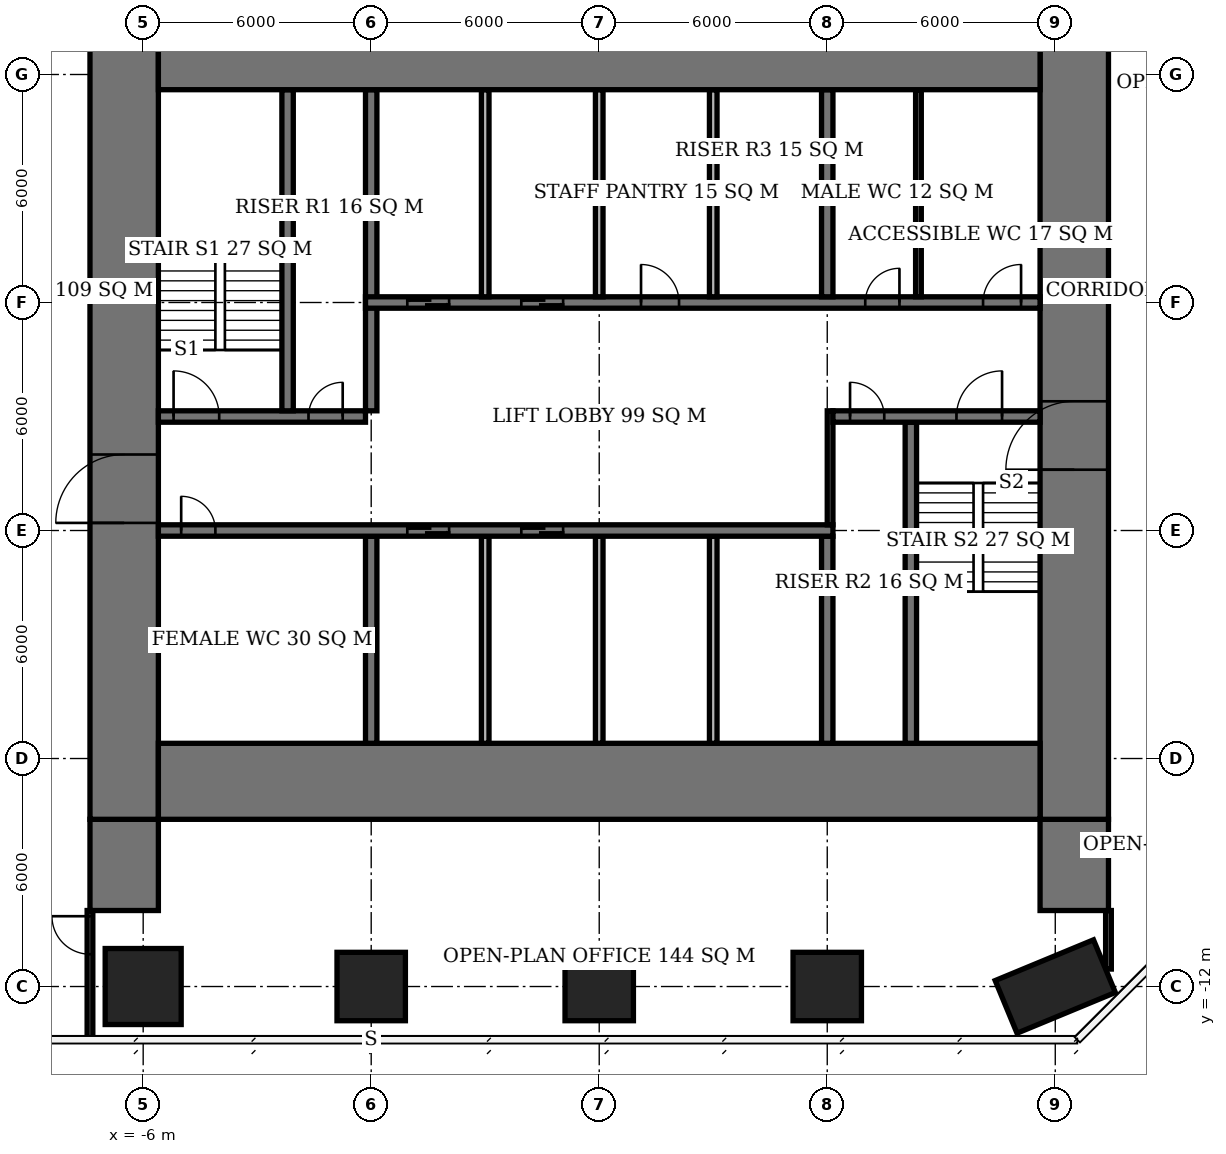
"""IFC4 building model, lengths in metres.
Left out: names, types, materials, properties, quantities, classifications, styles, units other than length and angle.
Written with IfcOpenShell. Run it as: python <this file> out.ifc"""

import sys

from ifc_helpers import new_model, si_unit, direction, frame, frame_2d, origin, origin_2d, place, context, subcontext, project, spatial, rectangle, extrude, element, fill, save


model = new_model("IFC4")
c1 = context("Model", 3, precision=1e-05, world=origin(), true_north=direction((0.0, 1.0)))
c2 = subcontext(c1, "Body", "Model", "MODEL_VIEW")
j1 = project(units=[si_unit("LENGTHUNIT", "METRE"), si_unit("PLANEANGLEUNIT", "RADIAN")], contexts=[c1])
p1 = place(None, origin())
s1 = spatial("IfcSite", under=j1, at=p1, CompositionType="ELEMENT")
p2 = place(p1, origin())
s2 = spatial("IfcBuilding", under=s1, at=p2, CompositionType="ELEMENT")
p3 = place(p2, frame((0.0, 0.0, 97.7)))
s3 = spatial("IfcBuildingStorey", under=s2, at=p3, CompositionType="ELEMENT", Elevation=97.7)
p4 = place(p3, frame((-6.0, -12.0, 0.0), z_axis=(0.0, 0.0, 1.0), x_axis=(1.0, 0.0, 0.0)))
e1 = element("IfcColumn", 1, at=p4, inside=s3, PredefinedType="COLUMN", context=c2, shape_type="SweptSolid", body=[
    extrude(rectangle(XDim=2.0, YDim=2.0, at=origin_2d()), origin(), (0.0, 0.0, 1.0), 3.9),
])
for number, where, z_axis, x_axis in (
    (2, (0.0, -12.0, 0.0), (0.0, 0.0, 1.0), (1.0, 0.0, 0.0)),
    (3, (6.0, -12.0, 0.0), (0.0, 0.0, 1.0), (1.0, 0.0, 0.0)),
    (4, (12.0, -12.0, 0.0), (0.0, 0.0, 1.0), (1.0, 0.0, 0.0)),
):
    element("IfcColumn", number, at=place(p3, frame(where, z_axis=z_axis, x_axis=x_axis)), inside=s3, PredefinedType="COLUMN", context=c2, shape_type="SweptSolid", body=[
        extrude(rectangle(XDim=1.8, YDim=1.8, at=origin_2d()), origin(), (0.0, 0.0, 1.0), 3.9),
    ])
p5 = place(p3, frame((18.0, -12.0, 0.0), z_axis=(0.0, 0.0, 1.0), x_axis=(-0.923879532511, -0.382683432365, 0.0)))
e5 = element("IfcColumn", 5, at=p5, inside=s3, PredefinedType="COLUMN", context=c2, shape_type="SweptSolid", body=[
    extrude(rectangle(XDim=2.8, YDim=1.5, at=origin_2d()), origin(), (0.0, 0.0, 1.0), 3.9),
])
for number, where, z_axis, x_axis in (
    (6, (-5.6, -6.6, 0.0), (0.0, 0.0, 1.0), (1.0, 0.0, 0.0)),
    (7, (-5.6, 12.6, 0.0), (0.0, 0.0, 1.0), (1.0, 0.0, 0.0)),
):
    element("IfcWall", number, at=place(p3, frame(where, z_axis=z_axis, x_axis=x_axis)), inside=s3, PredefinedType="SHEAR", context=c2, shape_type="SweptSolid", body=[
        extrude(rectangle(XDim=23.2, YDim=2.0, at=frame_2d((11.6, 0.0))), origin(), (0.0, 0.0, 1.0), 3.9),
    ])
p6 = place(p3, frame((-6.5, -7.6, 0.0), z_axis=(0.0, 0.0, 1.0), x_axis=(0.0, 1.0, 0.0)))
e8 = element("IfcWall", 8, at=p6, inside=s3, PredefinedType="SHEAR", context=c2, shape_type="SweptSolid", body=[
    extrude(rectangle(XDim=21.2, YDim=1.8, at=frame_2d((10.6, 0.0))), origin(), (0.0, 0.0, 1.0), 3.9),
])
p7 = place(p6, frame((7.8, 0.0, 0.0)))
e9 = element("IfcOpeningElement", 9, at=p7, cuts=e8, PredefinedType="OPENING", context=c2, shape_type="SweptSolid", body=[
    extrude(rectangle(XDim=1.8, YDim=2.4, at=frame_2d((0.9, 1.2))), frame((0.0, 0.91, 0.0), z_axis=(0.0, -1.0, 0.0), x_axis=(1.0, 0.0, 0.0)), (0.0, 0.0, 1.0), 1.82),
])
p8 = place(p3, frame((18.5, -7.6, 0.0), z_axis=(0.0, 0.0, 1.0), x_axis=(0.0, 1.0, 0.0)))
e10 = element("IfcWall", 10, at=p8, inside=s3, PredefinedType="SHEAR", context=c2, shape_type="SweptSolid", body=[
    extrude(rectangle(XDim=21.2, YDim=1.8, at=frame_2d((10.6, 0.0))), origin(), (0.0, 0.0, 1.0), 3.9),
])
p9 = place(p8, frame((9.2, 0.0, 0.0)))
e11 = element("IfcOpeningElement", 11, at=p9, cuts=e10, PredefinedType="OPENING", context=c2, shape_type="SweptSolid", body=[
    extrude(rectangle(XDim=1.8, YDim=2.4, at=frame_2d((0.9, 1.2))), frame((0.0, 0.91, 0.0), z_axis=(0.0, -1.0, 0.0), x_axis=(1.0, 0.0, 0.0)), (0.0, 0.0, 1.0), 1.82),
])
for number, where, z_axis, x_axis in (
    (12, (-6.5, -10.0, 0.0), (0.0, 0.0, 1.0), (0.0, 1.0, 0.0)),
    (13, (18.5, -10.0, 0.0), (0.0, 0.0, 1.0), (0.0, 1.0, 0.0)),
):
    element("IfcWall", number, at=place(p3, frame(where, z_axis=z_axis, x_axis=x_axis)), inside=s3, PredefinedType="SHEAR", context=c2, shape_type="SweptSolid", body=[
        extrude(rectangle(XDim=2.4, YDim=1.8, at=frame_2d((1.2, 0.0))), origin(), (0.0, 0.0, 1.0), 3.9),
    ])
p10 = place(p3, frame((-5.6, 0.0, 0.0), z_axis=(0.0, 0.0, 1.0), x_axis=(1.0, 0.0, 0.0)))
e14 = element("IfcWall", 14, at=p10, inside=s3, PredefinedType="SHEAR", context=c2, shape_type="SweptSolid", body=[
    extrude(rectangle(XDim=17.75, YDim=0.3, at=frame_2d((8.875, 0.0))), origin(), (0.0, 0.0, 1.0), 3.9),
])
p11 = place(p10, frame((0.6, 0.0, 0.0)))
e15 = element("IfcOpeningElement", 15, at=p11, cuts=e14, PredefinedType="OPENING", context=c2, shape_type="SweptSolid", body=[
    extrude(rectangle(XDim=0.9, YDim=2.1, at=frame_2d((0.45, 1.05))), frame((0.0, 0.16, 0.0), z_axis=(0.0, -1.0, 0.0), x_axis=(1.0, 0.0, 0.0)), (0.0, 0.0, 1.0), 0.32),
])
p12 = place(p10, frame((6.55, 0.0, 0.0)))
e16 = element("IfcOpeningElement", 16, at=p12, cuts=e14, PredefinedType="OPENING", context=c2, shape_type="SweptSolid", body=[
    extrude(rectangle(XDim=1.1, YDim=2.1, at=frame_2d((0.55, 1.05))), frame((0.0, 0.16, 0.0), z_axis=(0.0, -1.0, 0.0), x_axis=(1.0, 0.0, 0.0)), (0.0, 0.0, 1.0), 0.32),
])
p13 = place(p10, frame((9.55, 0.0, 0.0)))
e17 = element("IfcOpeningElement", 17, at=p13, cuts=e14, PredefinedType="OPENING", context=c2, shape_type="SweptSolid", body=[
    extrude(rectangle(XDim=1.1, YDim=2.1, at=frame_2d((0.55, 1.05))), frame((0.0, 0.16, 0.0), z_axis=(0.0, -1.0, 0.0), x_axis=(1.0, 0.0, 0.0)), (0.0, 0.0, 1.0), 0.32),
])
p14 = place(p3, frame((-5.6, 3.0, 0.0), z_axis=(0.0, 0.0, 1.0), x_axis=(1.0, 0.0, 0.0)))
e18 = element("IfcWall", 18, at=p14, inside=s3, PredefinedType="SHEAR", context=c2, shape_type="SweptSolid", body=[
    extrude(rectangle(XDim=5.45, YDim=0.3, at=frame_2d((2.725, 0.0))), origin(), (0.0, 0.0, 1.0), 3.9),
])
p15 = place(p14, frame((0.4, 0.0, 0.0)))
e19 = element("IfcOpeningElement", 19, at=p15, cuts=e18, PredefinedType="OPENING", context=c2, shape_type="SweptSolid", body=[
    extrude(rectangle(XDim=1.2, YDim=2.1, at=frame_2d((0.6, 1.05))), frame((0.0, 0.16, 0.0), z_axis=(0.0, -1.0, 0.0), x_axis=(1.0, 0.0, 0.0)), (0.0, 0.0, 1.0), 0.32),
])
p16 = place(p14, frame((3.95, 0.0, 0.0)))
e20 = element("IfcOpeningElement", 20, at=p16, cuts=e18, PredefinedType="OPENING", context=c2, shape_type="SweptSolid", body=[
    extrude(rectangle(XDim=0.9, YDim=2.1, at=frame_2d((0.45, 1.05))), frame((0.0, 0.16, 0.0), z_axis=(0.0, -1.0, 0.0), x_axis=(1.0, 0.0, 0.0)), (0.0, 0.0, 1.0), 0.32),
])
p17 = place(p3, frame((12.15, 3.0, 0.0), z_axis=(0.0, 0.0, 1.0), x_axis=(1.0, 0.0, 0.0)))
e21 = element("IfcWall", 21, at=p17, inside=s3, PredefinedType="SHEAR", context=c2, shape_type="SweptSolid", body=[
    extrude(rectangle(XDim=5.45, YDim=0.3, at=frame_2d((2.725, 0.0))), origin(), (0.0, 0.0, 1.0), 3.9),
])
p18 = place(p17, frame((3.25, 0.0, 0.0)))
e22 = element("IfcOpeningElement", 22, at=p18, cuts=e21, PredefinedType="OPENING", context=c2, shape_type="SweptSolid", body=[
    extrude(rectangle(XDim=1.2, YDim=2.1, at=frame_2d((0.6, 1.05))), frame((0.0, 0.16, 0.0), z_axis=(0.0, -1.0, 0.0), x_axis=(1.0, 0.0, 0.0)), (0.0, 0.0, 1.0), 0.32),
])
p19 = place(p17, frame((0.45, 0.0, 0.0)))
e23 = element("IfcOpeningElement", 23, at=p19, cuts=e21, PredefinedType="OPENING", context=c2, shape_type="SweptSolid", body=[
    extrude(rectangle(XDim=0.9, YDim=2.1, at=frame_2d((0.45, 1.05))), frame((0.0, 0.16, 0.0), z_axis=(0.0, -1.0, 0.0), x_axis=(1.0, 0.0, 0.0)), (0.0, 0.0, 1.0), 0.32),
])
p20 = place(p3, frame((-0.15, 6.0, 0.0), z_axis=(0.0, 0.0, 1.0), x_axis=(1.0, 0.0, 0.0)))
e24 = element("IfcWall", 24, at=p20, inside=s3, PredefinedType="SHEAR", context=c2, shape_type="SweptSolid", body=[
    extrude(rectangle(XDim=17.75, YDim=0.3, at=frame_2d((8.875, 0.0))), origin(), (0.0, 0.0, 1.0), 3.9),
])
p21 = place(p20, frame((13.15, 0.0, 0.0)))
e25 = element("IfcOpeningElement", 25, at=p21, cuts=e24, PredefinedType="OPENING", context=c2, shape_type="SweptSolid", body=[
    extrude(rectangle(XDim=0.9, YDim=2.1, at=frame_2d((0.45, 1.05))), frame((0.0, 0.16, 0.0), z_axis=(0.0, -1.0, 0.0), x_axis=(1.0, 0.0, 0.0)), (0.0, 0.0, 1.0), 0.32),
])
p22 = place(p20, frame((16.25, 0.0, 0.0)))
e26 = element("IfcOpeningElement", 26, at=p22, cuts=e24, PredefinedType="OPENING", context=c2, shape_type="SweptSolid", body=[
    extrude(rectangle(XDim=1.0, YDim=2.1, at=frame_2d((0.5, 1.05))), frame((0.0, 0.16, 0.0), z_axis=(0.0, -1.0, 0.0), x_axis=(1.0, 0.0, 0.0)), (0.0, 0.0, 1.0), 0.32),
])
p23 = place(p20, frame((7.25, 0.0, 0.0)))
e27 = element("IfcOpeningElement", 27, at=p23, cuts=e24, PredefinedType="OPENING", context=c2, shape_type="SweptSolid", body=[
    extrude(rectangle(XDim=1.0, YDim=2.1, at=frame_2d((0.5, 1.05))), frame((0.0, 0.16, 0.0), z_axis=(0.0, -1.0, 0.0), x_axis=(1.0, 0.0, 0.0)), (0.0, 0.0, 1.0), 0.32),
])
p24 = place(p20, frame((1.1, 0.0, 0.0)))
e28 = element("IfcOpeningElement", 28, at=p24, cuts=e24, PredefinedType="OPENING", context=c2, shape_type="SweptSolid", body=[
    extrude(rectangle(XDim=1.1, YDim=2.1, at=frame_2d((0.55, 1.05))), frame((0.0, 0.16, 0.0), z_axis=(0.0, -1.0, 0.0), x_axis=(1.0, 0.0, 0.0)), (0.0, 0.0, 1.0), 0.32),
])
p25 = place(p20, frame((4.1, 0.0, 0.0)))
e29 = element("IfcOpeningElement", 29, at=p25, cuts=e24, PredefinedType="OPENING", context=c2, shape_type="SweptSolid", body=[
    extrude(rectangle(XDim=1.1, YDim=2.1, at=frame_2d((0.55, 1.05))), frame((0.0, 0.16, 0.0), z_axis=(0.0, -1.0, 0.0), x_axis=(1.0, 0.0, 0.0)), (0.0, 0.0, 1.0), 0.32),
])
p26 = place(p3, frame((0.0, -5.6, 0.0), z_axis=(0.0, 0.0, 1.0), x_axis=(0.0, 1.0, 0.0)))
e30 = element("IfcWall", 30, at=p26, inside=s3, PredefinedType="SHEAR", context=c2, shape_type="SweptSolid", body=[
    extrude(rectangle(XDim=5.45, YDim=0.3, at=frame_2d((2.725, 0.0))), origin(), (0.0, 0.0, 1.0), 3.9),
])
p27 = place(p3, frame((0.0, 3.15, 0.0), z_axis=(0.0, 0.0, 1.0), x_axis=(0.0, 1.0, 0.0)))
e31 = element("IfcWall", 31, at=p27, inside=s3, PredefinedType="SHEAR", context=c2, shape_type="SweptSolid", body=[
    extrude(rectangle(XDim=8.45, YDim=0.3, at=frame_2d((4.225, 0.0))), origin(), (0.0, 0.0, 1.0), 3.9),
])
for number, where, z_axis, x_axis in (
    (32, (12.0, -5.6, 0.0), (0.0, 0.0, 1.0), (0.0, 1.0, 0.0)),
    (33, (12.0, 6.15, 0.0), (0.0, 0.0, 1.0), (0.0, 1.0, 0.0)),
):
    element("IfcWall", number, at=place(p3, frame(where, z_axis=z_axis, x_axis=x_axis)), inside=s3, PredefinedType="SHEAR", context=c2, shape_type="SweptSolid", body=[
        extrude(rectangle(XDim=5.45, YDim=0.3, at=frame_2d((2.725, 0.0))), origin(), (0.0, 0.0, 1.0), 3.9),
    ])
for number, where, z_axis, x_axis in (
    (34, (-2.2, 3.15, 0.0), (0.0, 0.0, 1.0), (0.0, 1.0, 0.0)),
    (35, (14.2, -5.6, 0.0), (0.0, 0.0, 1.0), (0.0, 1.0, 0.0)),
):
    element("IfcWall", number, at=place(p3, frame(where, z_axis=z_axis, x_axis=x_axis)), inside=s3, PredefinedType="SHEAR", context=c2, shape_type="SweptSolid", body=[
        extrude(rectangle(XDim=8.45, YDim=0.3, at=frame_2d((4.225, 0.0))), origin(), (0.0, 0.0, 1.0), 3.9),
    ])
for number, where, z_axis, x_axis in (
    (36, (3.0, 6.15, 0.0), (0.0, 0.0, 1.0), (0.0, 1.0, 0.0)),
    (37, (6.0, 6.15, 0.0), (0.0, 0.0, 1.0), (0.0, 1.0, 0.0)),
    (38, (9.0, 6.15, 0.0), (0.0, 0.0, 1.0), (0.0, 1.0, 0.0)),
    (39, (3.0, -5.6, 0.0), (0.0, 0.0, 1.0), (0.0, 1.0, 0.0)),
    (40, (6.0, -5.6, 0.0), (0.0, 0.0, 1.0), (0.0, 1.0, 0.0)),
    (41, (9.0, -5.6, 0.0), (0.0, 0.0, 1.0), (0.0, 1.0, 0.0)),
):
    element("IfcWall", number, at=place(p3, frame(where, z_axis=z_axis, x_axis=x_axis)), inside=s3, PredefinedType="SOLIDWALL", context=c2, shape_type="SweptSolid", body=[
        extrude(rectangle(XDim=5.45, YDim=0.2, at=frame_2d((2.725, 0.0))), origin(), (0.0, 0.0, 1.0), 3.9),
    ])
p28 = place(p3, frame((14.4, 6.15, 0.0), z_axis=(0.0, 0.0, 1.0), x_axis=(0.0, 1.0, 0.0)))
e42 = element("IfcWall", 42, at=p28, inside=s3, PredefinedType="PLUMBINGWALL", context=c2, shape_type="SweptSolid", body=[
    extrude(rectangle(XDim=5.45, YDim=0.15, at=frame_2d((2.725, 0.0))), origin(), (0.0, 0.0, 1.0), 3.65),
])
p29 = place(p3, frame((-7.4, -13.4, 0.0), z_axis=(0.0, 0.0, 1.0), x_axis=(0.0, 1.0, 0.0)))
e43 = element("IfcWall", 43, at=p29, inside=s3, PredefinedType="PARTITIONING", context=c2, shape_type="SweptSolid", body=[
    extrude(rectangle(XDim=3.4, YDim=0.15, at=frame_2d((1.7, 0.0))), origin(), (0.0, 0.0, 1.0), 3.65),
])
p30 = place(p29, frame((2.25, 0.0, 0.0)))
e44 = element("IfcOpeningElement", 44, at=p30, cuts=e43, PredefinedType="OPENING", context=c2, shape_type="SweptSolid", body=[
    extrude(rectangle(XDim=1.0, YDim=2.1, at=frame_2d((0.5, 1.05))), frame((0.0, 0.085, 0.0), z_axis=(0.0, -1.0, 0.0), x_axis=(1.0, 0.0, 0.0)), (0.0, 0.0, 1.0), 0.17),
])
p31 = place(p3, frame((19.4, -11.541, 0.0), z_axis=(0.0, 0.0, 1.0), x_axis=(0.0, 1.0, 0.0)))
e45 = element("IfcWall", 45, at=p31, inside=s3, PredefinedType="PARTITIONING", context=c2, shape_type="SweptSolid", body=[
    extrude(rectangle(XDim=1.541, YDim=0.15, at=frame_2d((0.77, 0.0))), origin(), (0.0, 0.0, 1.0), 3.65),
])
p32 = place(p3, frame((12.075, 0.15, 0.0), z_axis=(0.0, 0.0, 1.0), x_axis=(0.0, 1.0, 0.0)))
e46 = element("IfcWall", 46, at=p32, inside=s3, PredefinedType="PARTITIONING", context=c2, shape_type="SweptSolid", body=[
    extrude(rectangle(XDim=3.0, YDim=0.15, at=frame_2d((1.5, 0.0))), origin(), (0.0, 0.0, 1.0), 3.65),
])
p33 = place(p7, origin())
e47 = element("IfcDoor", 47, at=p33, inside=s3, OperationType="DOUBLE_DOOR_SINGLE_SWING", PredefinedType="DOOR", context=c2, shape_type="SweptSolid", body=[
    extrude(rectangle(XDim=1.8, YDim=2.4, at=frame_2d((0.9, 1.2))), frame((0.0, 0.025, 0.0), z_axis=(0.0, -1.0, 0.0), x_axis=(1.0, 0.0, 0.0)), (0.0, 0.0, 1.0), 0.05),
])
fill(e9, e47)
p34 = place(p9, origin())
e48 = element("IfcDoor", 48, at=p34, inside=s3, OperationType="DOUBLE_DOOR_SINGLE_SWING", PredefinedType="DOOR", context=c2, shape_type="SweptSolid", body=[
    extrude(rectangle(XDim=1.8, YDim=2.4, at=frame_2d((0.9, 1.2))), frame((0.0, 0.025, 0.0), z_axis=(0.0, -1.0, 0.0), x_axis=(1.0, 0.0, 0.0)), (0.0, 0.0, 1.0), 0.05),
])
fill(e11, e48)
p35 = place(p15, origin())
e49 = element("IfcDoor", 49, at=p35, inside=s3, OperationType="SINGLE_SWING_LEFT", PredefinedType="DOOR", context=c2, shape_type="SweptSolid", body=[
    extrude(rectangle(XDim=1.2, YDim=2.1, at=frame_2d((0.6, 1.05))), frame((0.0, 0.025, 0.0), z_axis=(0.0, -1.0, 0.0), x_axis=(1.0, 0.0, 0.0)), (0.0, 0.0, 1.0), 0.05),
])
fill(e19, e49)
p36 = place(p16, origin())
e50 = element("IfcDoor", 50, at=p36, inside=s3, OperationType="SINGLE_SWING_RIGHT", PredefinedType="DOOR", context=c2, shape_type="SweptSolid", body=[
    extrude(rectangle(XDim=0.9, YDim=2.1, at=frame_2d((0.45, 1.05))), frame((0.0, 0.025, 0.0), z_axis=(0.0, -1.0, 0.0), x_axis=(1.0, 0.0, 0.0)), (0.0, 0.0, 1.0), 0.05),
])
fill(e20, e50)
p37 = place(p18, origin())
e51 = element("IfcDoor", 51, at=p37, inside=s3, OperationType="SINGLE_SWING_RIGHT", PredefinedType="DOOR", context=c2, shape_type="SweptSolid", body=[
    extrude(rectangle(XDim=1.2, YDim=2.1, at=frame_2d((0.6, 1.05))), frame((0.0, 0.025, 0.0), z_axis=(0.0, -1.0, 0.0), x_axis=(1.0, 0.0, 0.0)), (0.0, 0.0, 1.0), 0.05),
])
fill(e22, e51)
p38 = place(p19, origin())
e52 = element("IfcDoor", 52, at=p38, inside=s3, OperationType="SINGLE_SWING_LEFT", PredefinedType="DOOR", context=c2, shape_type="SweptSolid", body=[
    extrude(rectangle(XDim=0.9, YDim=2.1, at=frame_2d((0.45, 1.05))), frame((0.0, 0.025, 0.0), z_axis=(0.0, -1.0, 0.0), x_axis=(1.0, 0.0, 0.0)), (0.0, 0.0, 1.0), 0.05),
])
fill(e23, e52)
p39 = place(p11, origin())
e53 = element("IfcDoor", 53, at=p39, inside=s3, OperationType="SINGLE_SWING_LEFT", PredefinedType="DOOR", context=c2, shape_type="SweptSolid", body=[
    extrude(rectangle(XDim=0.9, YDim=2.1, at=frame_2d((0.45, 1.05))), frame((0.0, 0.025, 0.0), z_axis=(0.0, -1.0, 0.0), x_axis=(1.0, 0.0, 0.0)), (0.0, 0.0, 1.0), 0.05),
])
fill(e15, e53)
p40 = place(p21, origin())
e54 = element("IfcDoor", 54, at=p40, inside=s3, OperationType="SINGLE_SWING_RIGHT", PredefinedType="DOOR", context=c2, shape_type="SweptSolid", body=[
    extrude(rectangle(XDim=0.9, YDim=2.1, at=frame_2d((0.45, 1.05))), frame((0.0, 0.025, 0.0), z_axis=(0.0, -1.0, 0.0), x_axis=(1.0, 0.0, 0.0)), (0.0, 0.0, 1.0), 0.05),
])
fill(e25, e54)
p41 = place(p22, origin())
e55 = element("IfcDoor", 55, at=p41, inside=s3, OperationType="SINGLE_SWING_RIGHT", PredefinedType="DOOR", context=c2, shape_type="SweptSolid", body=[
    extrude(rectangle(XDim=1.0, YDim=2.1, at=frame_2d((0.5, 1.05))), frame((0.0, 0.025, 0.0), z_axis=(0.0, -1.0, 0.0), x_axis=(1.0, 0.0, 0.0)), (0.0, 0.0, 1.0), 0.05),
])
fill(e26, e55)
p42 = place(p23, origin())
e56 = element("IfcDoor", 56, at=p42, inside=s3, OperationType="SINGLE_SWING_LEFT", PredefinedType="DOOR", context=c2, shape_type="SweptSolid", body=[
    extrude(rectangle(XDim=1.0, YDim=2.1, at=frame_2d((0.5, 1.05))), frame((0.0, 0.025, 0.0), z_axis=(0.0, -1.0, 0.0), x_axis=(1.0, 0.0, 0.0)), (0.0, 0.0, 1.0), 0.05),
])
fill(e27, e56)
p43 = place(p24, origin())
e57 = element("IfcDoor", 57, at=p43, inside=s3, OperationType="DOUBLE_DOOR_SLIDING", PredefinedType="USERDEFINED", context=c2, shape_type="SweptSolid", body=[
    extrude(rectangle(XDim=1.1, YDim=2.1, at=frame_2d((0.55, 1.05))), frame((0.0, 0.025, 0.0), z_axis=(0.0, -1.0, 0.0), x_axis=(1.0, 0.0, 0.0)), (0.0, 0.0, 1.0), 0.05),
])
fill(e28, e57)
p44 = place(p25, origin())
e58 = element("IfcDoor", 58, at=p44, inside=s3, OperationType="DOUBLE_DOOR_SLIDING", PredefinedType="USERDEFINED", context=c2, shape_type="SweptSolid", body=[
    extrude(rectangle(XDim=1.1, YDim=2.1, at=frame_2d((0.55, 1.05))), frame((0.0, 0.025, 0.0), z_axis=(0.0, -1.0, 0.0), x_axis=(1.0, 0.0, 0.0)), (0.0, 0.0, 1.0), 0.05),
])
fill(e29, e58)
p45 = place(p12, origin())
e59 = element("IfcDoor", 59, at=p45, inside=s3, OperationType="DOUBLE_DOOR_SLIDING", PredefinedType="USERDEFINED", context=c2, shape_type="SweptSolid", body=[
    extrude(rectangle(XDim=1.1, YDim=2.1, at=frame_2d((0.55, 1.05))), frame((0.0, 0.025, 0.0), z_axis=(0.0, -1.0, 0.0), x_axis=(1.0, 0.0, 0.0)), (0.0, 0.0, 1.0), 0.05),
])
fill(e16, e59)
p46 = place(p13, origin())
e60 = element("IfcDoor", 60, at=p46, inside=s3, OperationType="DOUBLE_DOOR_SLIDING", PredefinedType="USERDEFINED", context=c2, shape_type="SweptSolid", body=[
    extrude(rectangle(XDim=1.1, YDim=2.1, at=frame_2d((0.55, 1.05))), frame((0.0, 0.025, 0.0), z_axis=(0.0, -1.0, 0.0), x_axis=(1.0, 0.0, 0.0)), (0.0, 0.0, 1.0), 0.05),
])
fill(e17, e60)
p47 = place(p30, origin())
e61 = element("IfcDoor", 61, at=p47, inside=s3, OperationType="SINGLE_SWING_RIGHT", PredefinedType="DOOR", context=c2, shape_type="SweptSolid", body=[
    extrude(rectangle(XDim=1.0, YDim=2.1, at=frame_2d((0.5, 1.05))), frame((0.0, 0.025, 0.0), z_axis=(0.0, -1.0, 0.0), x_axis=(1.0, 0.0, 0.0)), (0.0, 0.0, 1.0), 0.05),
])
fill(e44, e61)
save(model, sys.argv[1])
